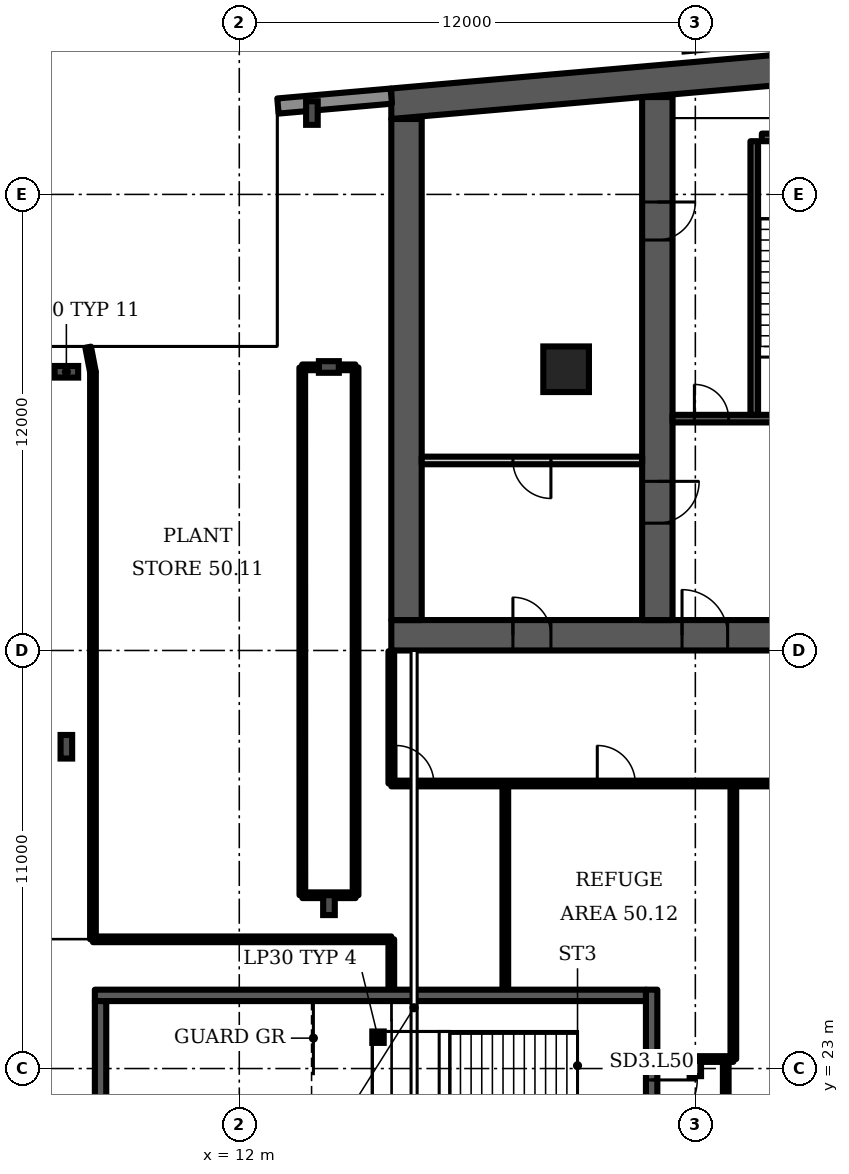
"""IFC4 building model, lengths in metres.
Left out: names, types, materials, properties, quantities, classifications, styles, units other than length and angle.
Written with IfcOpenShell. Run it as: python <this file> out.ifc"""

import sys

from ifc_helpers import new_model, si_unit, direction, frame, frame_2d, origin, origin_2d, place, context, subcontext, project, spatial, polyline, rectangle, i_section, outline, extrude, element, fill, save


model = new_model("IFC4")
c1 = context("Model", 3, precision=1e-05, world=origin(), true_north=direction((0.0, 1.0)))
c2 = subcontext(c1, "Body", "Model", "MODEL_VIEW")
j1 = project(units=[si_unit("LENGTHUNIT", "METRE"), si_unit("PLANEANGLEUNIT", "RADIAN")], contexts=[c1])
p1 = place(None, origin())
s1 = spatial("IfcSite", under=j1, at=p1, CompositionType="ELEMENT")
p2 = place(p1, origin())
s2 = spatial("IfcBuilding", under=s1, at=p2, CompositionType="ELEMENT")
p3 = place(p2, frame((0.0, 0.0, 202.3)))
s3 = spatial("IfcBuildingStorey", under=s2, at=p3, CompositionType="ELEMENT", Elevation=202.3)
p4 = place(p3, origin())
e1 = element("IfcWall", 1, at=p4, inside=s3, PredefinedType="SHEAR", context=c2, shape_type="SweptSolid", body=[
    extrude(outline(polyline([(16.0, 47.984), (37.0, 49.822), (58.0, 47.984), (58.0, 48.787), (37.0, 50.625), (16.0, 48.787), (16.0, 47.984)])), origin(), (0.0, 0.0, 1.0), 4.8),
])
p5 = place(p3, frame((16.0, 34.4, 0.0), z_axis=(0.0, 0.0, 1.0), x_axis=(1.0, 0.0, 0.0)))
e2 = element("IfcWall", 2, at=p5, inside=s3, PredefinedType="SHEAR", context=c2, shape_type="SweptSolid", body=[
    extrude(rectangle(XDim=42.0, YDim=0.8, at=frame_2d((21.0, 0.0))), origin(), (0.0, 0.0, 1.0), 4.8),
])
p6 = place(p5, frame((3.2, 0.0, 0.0)))
e3 = element("IfcOpeningElement", 3, at=p6, cuts=e2, PredefinedType="OPENING", context=c2, shape_type="SweptSolid", body=[
    extrude(rectangle(XDim=1.0, YDim=2.1, at=frame_2d((0.5, 1.05))), frame((0.0, 0.41, 0.0), z_axis=(0.0, -1.0, 0.0), x_axis=(1.0, 0.0, 0.0)), (0.0, 0.0, 1.0), 0.82),
])
p7 = place(p5, frame((7.65, 0.0, 0.0)))
e4 = element("IfcOpeningElement", 4, at=p7, cuts=e2, PredefinedType="OPENING", context=c2, shape_type="SweptSolid", body=[
    extrude(rectangle(XDim=1.2, YDim=2.1, at=frame_2d((0.6, 1.05))), frame((0.0, 0.41, 0.0), z_axis=(0.0, -1.0, 0.0), x_axis=(1.0, 0.0, 0.0)), (0.0, 0.0, 1.0), 0.82),
])
p8 = place(p5, frame((14.767, 0.0, 0.0)))
e5 = element("IfcOpeningElement", 5, at=p8, cuts=e2, PredefinedType="OPENING", context=c2, shape_type="SweptSolid", body=[
    extrude(rectangle(XDim=1.1, YDim=2.1, at=frame_2d((0.55, 1.05))), frame((0.0, 0.41, 0.0), z_axis=(0.0, -1.0, 0.0), x_axis=(1.0, 0.0, 0.0)), (0.0, 0.0, 1.0), 0.82),
])
p9 = place(p5, frame((19.133, 0.0, 0.0)))
e6 = element("IfcOpeningElement", 6, at=p9, cuts=e2, PredefinedType="OPENING", context=c2, shape_type="SweptSolid", body=[
    extrude(rectangle(XDim=1.1, YDim=2.1, at=frame_2d((0.55, 1.05))), frame((0.0, 0.41, 0.0), z_axis=(0.0, -1.0, 0.0), x_axis=(1.0, 0.0, 0.0)), (0.0, 0.0, 1.0), 0.82),
])
p10 = place(p5, frame((16.8, 0.0, 0.0)))
e7 = element("IfcOpeningElement", 7, at=p10, cuts=e2, PredefinedType="OPENING", context=c2, shape_type="SweptSolid", body=[
    extrude(rectangle(XDim=1.4, YDim=2.1, at=frame_2d((0.7, 1.05))), frame((0.0, 0.41, 0.0), z_axis=(0.0, -1.0, 0.0), x_axis=(1.0, 0.0, 0.0)), (0.0, 0.0, 1.0), 0.82),
])
p11 = place(p5, frame((21.767, 0.0, 0.0)))
e8 = element("IfcOpeningElement", 8, at=p11, cuts=e2, PredefinedType="OPENING", context=c2, shape_type="SweptSolid", body=[
    extrude(rectangle(XDim=1.1, YDim=2.1, at=frame_2d((0.55, 1.05))), frame((0.0, 0.41, 0.0), z_axis=(0.0, -1.0, 0.0), x_axis=(1.0, 0.0, 0.0)), (0.0, 0.0, 1.0), 0.82),
])
p12 = place(p5, frame((23.95, 0.0, 0.0)))
e9 = element("IfcOpeningElement", 9, at=p12, cuts=e2, PredefinedType="OPENING", context=c2, shape_type="SweptSolid", body=[
    extrude(rectangle(XDim=1.1, YDim=2.1, at=frame_2d((0.55, 1.05))), frame((0.0, 0.41, 0.0), z_axis=(0.0, -1.0, 0.0), x_axis=(1.0, 0.0, 0.0)), (0.0, 0.0, 1.0), 0.82),
])
p13 = place(p5, frame((26.133, 0.0, 0.0)))
e10 = element("IfcOpeningElement", 10, at=p13, cuts=e2, PredefinedType="OPENING", context=c2, shape_type="SweptSolid", body=[
    extrude(rectangle(XDim=1.1, YDim=2.1, at=frame_2d((0.55, 1.05))), frame((0.0, 0.41, 0.0), z_axis=(0.0, -1.0, 0.0), x_axis=(1.0, 0.0, 0.0)), (0.0, 0.0, 1.0), 0.82),
])
p14 = place(p5, frame((33.15, 0.0, 0.0)))
e11 = element("IfcOpeningElement", 11, at=p14, cuts=e2, PredefinedType="OPENING", context=c2, shape_type="SweptSolid", body=[
    extrude(rectangle(XDim=1.2, YDim=2.1, at=frame_2d((0.6, 1.05))), frame((0.0, 0.41, 0.0), z_axis=(0.0, -1.0, 0.0), x_axis=(1.0, 0.0, 0.0)), (0.0, 0.0, 1.0), 0.82),
])
p15 = place(p5, frame((37.767, 0.0, 0.0)))
e12 = element("IfcOpeningElement", 12, at=p15, cuts=e2, PredefinedType="OPENING", context=c2, shape_type="SweptSolid", body=[
    extrude(rectangle(XDim=1.4, YDim=2.1, at=frame_2d((0.7, 1.05))), frame((0.0, 0.41, 0.0), z_axis=(0.0, -1.0, 0.0), x_axis=(1.0, 0.0, 0.0)), (0.0, 0.0, 1.0), 0.82),
])
p16 = place(p3, frame((16.4, 34.8, 0.0), z_axis=(0.0, 0.0, 1.0), x_axis=(0.0, 1.0, 0.0)))
e13 = element("IfcWall", 13, at=p16, inside=s3, PredefinedType="SHEAR", context=c2, shape_type="SweptSolid", body=[
    extrude(rectangle(XDim=13.184, YDim=0.8, at=frame_2d((6.592, 0.0))), origin(), (0.0, 0.0, 1.0), 4.8),
])
p17 = place(p3, frame((23.0, 34.8, 0.0), z_axis=(0.0, 0.0, 1.0), x_axis=(0.0, 1.0, 0.0)))
e14 = element("IfcWall", 14, at=p17, inside=s3, PredefinedType="SHEAR", context=c2, shape_type="SweptSolid", body=[
    extrude(rectangle(XDim=13.762, YDim=0.8, at=frame_2d((6.881, 0.0))), origin(), (0.0, 0.0, 1.0), 4.8),
])
p18 = place(p17, frame((2.55, 0.0, 0.0)))
e15 = element("IfcOpeningElement", 15, at=p18, cuts=e14, PredefinedType="OPENING", context=c2, shape_type="SweptSolid", body=[
    extrude(rectangle(XDim=1.1, YDim=2.1, at=frame_2d((0.55, 1.05))), frame((0.0, 0.41, 0.0), z_axis=(0.0, -1.0, 0.0), x_axis=(1.0, 0.0, 0.0)), (0.0, 0.0, 1.0), 0.82),
])
p19 = place(p17, frame((10.0, 0.0, 0.0)))
e16 = element("IfcOpeningElement", 16, at=p19, cuts=e14, PredefinedType="OPENING", context=c2, shape_type="SweptSolid", body=[
    extrude(rectangle(XDim=1.0, YDim=2.1, at=frame_2d((0.5, 1.05))), frame((0.0, 0.41, 0.0), z_axis=(0.0, -1.0, 0.0), x_axis=(1.0, 0.0, 0.0)), (0.0, 0.0, 1.0), 0.82),
])
p20 = place(p3, frame((20.6, 41.4, 0.0), z_axis=(0.0, 0.0, 1.0), x_axis=(1.0, 0.0, 0.0)))
e17 = element("IfcColumn", 17, at=p20, inside=s3, PredefinedType="COLUMN", context=c2, shape_type="SweptSolid", body=[
    extrude(rectangle(XDim=1.2, YDim=1.2, at=origin_2d()), origin(), (0.0, 0.0, 1.0), 4.8),
])
for number, where, z_axis, x_axis in (
    (18, (14.357, 41.46, 0.0), (0.0, 0.0, 1.0), (0.0, 1.0, 0.0)),
    (19, (14.36, 27.3, 0.0), (0.0, 0.0, 1.0), (-1.0, 0.0, 0.0)),
):
    element("IfcColumn", number, at=place(p3, frame(where, z_axis=z_axis, x_axis=x_axis)), inside=s3, PredefinedType="COLUMN", context=c2, shape_type="SweptSolid", body=[
        extrude(i_section(OverallWidth=0.306, OverallDepth=0.524, WebThickness=0.021, FlangeThickness=0.04, FilletRadius=0.027, at=origin_2d()), origin(), (0.0, 0.0, 1.0), 4.8),
    ])
p21 = place(p3, frame((24.0, 23.0, 0.0), z_axis=(0.0, 0.0, 1.0), x_axis=(1.0, 0.0, 0.0)))
e20 = element("IfcColumn", 20, at=p21, inside=s3, PredefinedType="COLUMN", context=c2, shape_type="SweptSolid", body=[
    extrude(i_section(OverallWidth=0.3, OverallDepth=0.4, WebThickness=0.013, FlangeThickness=0.024, FilletRadius=0.027, at=origin_2d()), origin(), (0.0, 0.0, 1.0), 4.8),
])
for number, where, z_axis, x_axis in (
    (21, (13.911, 48.141, 0.0), (0.0, 0.0, 1.0), (-1.0, 0.0, 0.0)),
    (22, (7.45, 41.333, 0.0), (0.0, 0.0, 1.0), (0.0, 1.0, 0.0)),
    (23, (7.45, 31.467, 0.0), (0.0, 0.0, 1.0), (-1.0, 0.0, 0.0)),
):
    element("IfcColumn", number, at=place(p3, frame(where, z_axis=z_axis, x_axis=x_axis)), inside=s3, PredefinedType="COLUMN", context=c2, shape_type="SweptSolid", body=[
        extrude(i_section(OverallWidth=0.305, OverallDepth=0.62, WebThickness=0.021, FlangeThickness=0.04, FilletRadius=0.027, at=origin_2d()), origin(), (0.0, 0.0, 1.0), 4.8),
    ])
p22 = place(p3, frame((16.0, 48.587, 0.0), z_axis=(0.0, 0.0, 1.0), x_axis=(-0.996194, -0.087168, 0.0)))
e24 = element("IfcWall", 24, at=p22, inside=s3, PredefinedType="SOLIDWALL", context=c2, shape_type="SweptSolid", body=[
    extrude(rectangle(XDim=2.994, YDim=0.4, at=frame_2d((1.497, 0.0))), origin(), (0.0, 0.0, 1.0), 4.4),
])
p23 = place(p3, frame((16.8, 39.0, 0.0), z_axis=(0.0, 0.0, 1.0), x_axis=(1.0, 0.0, 0.0)))
e25 = element("IfcWall", 25, at=p23, inside=s3, PredefinedType="PARTITIONING", context=c2, shape_type="SweptSolid", body=[
    extrude(rectangle(XDim=5.8, YDim=0.2, at=frame_2d((2.9, 0.0))), origin(), (0.0, 0.0, 1.0), 4.4),
])
p24 = place(p23, frame((2.4, 0.0, 0.0)))
e26 = element("IfcOpeningElement", 26, at=p24, cuts=e25, PredefinedType="OPENING", context=c2, shape_type="SweptSolid", body=[
    extrude(rectangle(XDim=1.0, YDim=2.1, at=frame_2d((0.5, 1.05))), frame((0.0, 0.11, 0.0), z_axis=(0.0, -1.0, 0.0), x_axis=(1.0, 0.0, 0.0)), (0.0, 0.0, 1.0), 0.22),
])
p25 = place(p3, frame((23.4, 40.1, 0.0), z_axis=(0.0, 0.0, 1.0), x_axis=(1.0, 0.0, 0.0)))
e27 = element("IfcWall", 27, at=p25, inside=s3, PredefinedType="SHEAR", context=c2, shape_type="SweptSolid", body=[
    extrude(rectangle(XDim=6.2, YDim=0.2, at=frame_2d((3.1, 0.0))), origin(), (0.0, 0.0, 1.0), 4.4),
])
p26 = place(p25, frame((3.525, 0.0, 0.0)))
e28 = element("IfcOpeningElement", 28, at=p26, cuts=e27, PredefinedType="OPENING", context=c2, shape_type="SweptSolid", body=[
    extrude(rectangle(XDim=1.2, YDim=2.1, at=frame_2d((0.6, 1.05))), frame((0.0, 0.11, 0.0), z_axis=(0.0, -1.0, 0.0), x_axis=(1.0, 0.0, 0.0)), (0.0, 0.0, 1.0), 0.22),
])
p27 = place(p25, frame((0.575, 0.0, 0.0)))
e29 = element("IfcOpeningElement", 29, at=p27, cuts=e27, PredefinedType="OPENING", context=c2, shape_type="SweptSolid", body=[
    extrude(rectangle(XDim=0.9, YDim=2.1, at=frame_2d((0.45, 1.05))), frame((0.0, 0.11, 0.0), z_axis=(0.0, -1.0, 0.0), x_axis=(1.0, 0.0, 0.0)), (0.0, 0.0, 1.0), 0.22),
])
p28 = place(p3, frame((25.55, 40.2, 0.0), z_axis=(0.0, 0.0, 1.0), x_axis=(0.0, 1.0, 0.0)))
e30 = element("IfcWall", 30, at=p28, inside=s3, PredefinedType="SHEAR", context=c2, shape_type="SweptSolid", body=[
    extrude(rectangle(XDim=7.2, YDim=0.2, at=frame_2d((3.6, 0.0))), origin(), (0.0, 0.0, 1.0), 4.4),
])
p29 = place(p3, frame((25.75, 47.5, 0.0), z_axis=(0.0, 0.0, 1.0), x_axis=(1.0, 0.0, 0.0)))
e31 = element("IfcWall", 31, at=p29, inside=s3, PredefinedType="SHEAR", context=c2, shape_type="SweptSolid", body=[
    extrude(rectangle(XDim=3.85, YDim=0.2, at=frame_2d((1.925, 0.0))), origin(), (0.0, 0.0, 1.0), 4.4),
])
p30 = place(p3, frame((22.85, 19.925, 0.0), z_axis=(0.0, 0.0, 1.0), x_axis=(0.0, 1.0, 0.0)))
e32 = element("IfcWall", 32, at=p30, inside=s3, PredefinedType="SHEAR", context=c2, shape_type="SweptSolid", body=[
    extrude(rectangle(XDim=5.15, YDim=0.3, at=frame_2d((2.575, 0.0))), origin(), (0.0, 0.0, 1.0), 4.4),
])
p31 = place(p30, frame((1.575, 0.0, 0.0)))
e33 = element("IfcOpeningElement", 33, at=p31, cuts=e32, PredefinedType="OPENING", context=c2, shape_type="SweptSolid", body=[
    extrude(rectangle(XDim=1.2, YDim=2.1, at=frame_2d((0.6, 1.05))), frame((0.0, 0.16, 0.0), z_axis=(0.0, -1.0, 0.0), x_axis=(1.0, 0.0, 0.0)), (0.0, 0.0, 1.0), 0.32),
])
p32 = place(p3, frame((8.15, 41.325, 0.0), z_axis=(0.0, 0.0, 1.0), x_axis=(-0.188861, 0.982004, 0.0)))
e34 = element("IfcWall", 34, at=p32, inside=s3, PredefinedType="PARTITIONING", context=c2, shape_type="SweptSolid", body=[
    extrude(rectangle(XDim=0.667, YDim=0.15, at=frame_2d((0.333, 0.0))), origin(), (0.0, 0.0, 1.0), 4.4),
])
p33 = place(p3, frame((8.15, 26.4, 0.0), z_axis=(0.0, 0.0, 1.0), x_axis=(0.0, 1.0, 0.0)))
e35 = element("IfcWall", 35, at=p33, inside=s3, PredefinedType="PARTITIONING", context=c2, shape_type="SweptSolid", body=[
    extrude(rectangle(XDim=14.923, YDim=0.15, at=frame_2d((7.461, 0.0))), origin(), (0.0, 0.0, 1.0), 4.4),
])
p34 = place(p3, frame((8.15, 26.4, 0.0), z_axis=(0.0, 0.0, 1.0), x_axis=(1.0, 0.0, 0.0)))
e36 = element("IfcWall", 36, at=p34, inside=s3, PredefinedType="PARTITIONING", context=c2, shape_type="SweptSolid", body=[
    extrude(rectangle(XDim=7.85, YDim=0.15, at=frame_2d((3.925, 0.0))), origin(), (0.0, 0.0, 1.0), 4.4),
])
p35 = place(p3, frame((13.655, 41.45, 0.0), z_axis=(0.0, 0.0, 1.0), x_axis=(1.0, 0.0, 0.0)))
e37 = element("IfcWall", 37, at=p35, inside=s3, PredefinedType="PARTITIONING", context=c2, shape_type="SweptSolid", body=[
    extrude(rectangle(XDim=1.4, YDim=0.15, at=frame_2d((0.7, 0.0))), origin(), (0.0, 0.0, 1.0), 4.4),
])
p36 = place(p3, frame((13.66, 27.562, 0.0), z_axis=(0.0, 0.0, 1.0), x_axis=(-0.000211, 0.999998, 0.0)))
e38 = element("IfcWall", 38, at=p36, inside=s3, PredefinedType="PARTITIONING", context=c2, shape_type="SweptSolid", body=[
    extrude(rectangle(XDim=13.883, YDim=0.15, at=frame_2d((6.941, 0.0))), origin(), (0.0, 0.0, 1.0), 4.4),
])
p37 = place(p3, frame((13.66, 27.56, 0.0), z_axis=(0.0, 0.0, 1.0), x_axis=(1.0, 0.0, 0.0)))
e39 = element("IfcWall", 39, at=p37, inside=s3, PredefinedType="PARTITIONING", context=c2, shape_type="SweptSolid", body=[
    extrude(rectangle(XDim=1.4, YDim=0.15, at=frame_2d((0.7, 0.0))), origin(), (0.0, 0.0, 1.0), 4.4),
])
p38 = place(p3, frame((15.06, 27.56, 0.0), z_axis=(0.0, 0.0, 1.0), x_axis=(0.0, 1.0, 0.0)))
e40 = element("IfcWall", 40, at=p38, inside=s3, PredefinedType="PARTITIONING", context=c2, shape_type="SweptSolid", body=[
    extrude(rectangle(XDim=13.886, YDim=0.15, at=frame_2d((6.943, 0.0))), origin(), (0.0, 0.0, 1.0), 4.4),
])
p39 = place(p3, frame((16.0, 25.095, 0.0), z_axis=(0.0, 0.0, 1.0), x_axis=(0.0, 1.0, 0.0)))
e41 = element("IfcWall", 41, at=p39, inside=s3, PredefinedType="PARTITIONING", context=c2, shape_type="SweptSolid", body=[
    extrude(rectangle(XDim=1.305, YDim=0.15, at=frame_2d((0.652, 0.0))), origin(), (0.0, 0.0, 1.0), 4.4),
])
p40 = place(p3, frame((16.0, 30.5, 0.0), z_axis=(0.0, 0.0, 1.0), x_axis=(0.0, 1.0, 0.0)))
e42 = element("IfcWall", 42, at=p40, inside=s3, PredefinedType="PARTITIONING", context=c2, shape_type="SweptSolid", body=[
    extrude(rectangle(XDim=3.48, YDim=0.15, at=frame_2d((1.74, 0.0))), origin(), (0.0, 0.0, 1.0), 4.4),
])
p41 = place(p3, frame((16.0, 30.5, 0.0), z_axis=(0.0, 0.0, 1.0), x_axis=(1.0, 0.0, 0.0)))
e43 = element("IfcWall", 43, at=p41, inside=s3, PredefinedType="PARTITIONING", context=c2, shape_type="SweptSolid", body=[
    extrude(rectangle(XDim=20.85, YDim=0.15, at=frame_2d((10.425, 0.0))), origin(), (0.0, 0.0, 1.0), 4.4),
])
p42 = place(p41, frame((0.12, 0.0, 0.0)))
e44 = element("IfcOpeningElement", 44, at=p42, cuts=e43, PredefinedType="OPENING", context=c2, shape_type="SweptSolid", body=[
    extrude(rectangle(XDim=1.0, YDim=2.1, at=frame_2d((0.5, 1.05))), frame((0.0, 0.085, 0.0), z_axis=(0.0, -1.0, 0.0), x_axis=(1.0, 0.0, 0.0)), (0.0, 0.0, 1.0), 0.17),
])
p43 = place(p41, frame((5.42, 0.0, 0.0)))
e45 = element("IfcOpeningElement", 45, at=p43, cuts=e43, PredefinedType="OPENING", context=c2, shape_type="SweptSolid", body=[
    extrude(rectangle(XDim=1.0, YDim=2.1, at=frame_2d((0.5, 1.05))), frame((0.0, 0.085, 0.0), z_axis=(0.0, -1.0, 0.0), x_axis=(1.0, 0.0, 0.0)), (0.0, 0.0, 1.0), 0.17),
])
p44 = place(p41, frame((14.5, 0.0, 0.0)))
e46 = element("IfcOpeningElement", 46, at=p44, cuts=e43, PredefinedType="OPENING", context=c2, shape_type="SweptSolid", body=[
    extrude(rectangle(XDim=1.0, YDim=2.1, at=frame_2d((0.5, 1.05))), frame((0.0, 0.085, 0.0), z_axis=(0.0, -1.0, 0.0), x_axis=(1.0, 0.0, 0.0)), (0.0, 0.0, 1.0), 0.17),
])
p45 = place(p3, frame((19.0, 25.095, 0.0), z_axis=(0.0, 0.0, 1.0), x_axis=(0.0, 1.0, 0.0)))
e47 = element("IfcWall", 47, at=p45, inside=s3, PredefinedType="PARTITIONING", context=c2, shape_type="SweptSolid", body=[
    extrude(rectangle(XDim=5.405, YDim=0.15, at=frame_2d((2.703, 0.0))), origin(), (0.0, 0.0, 1.0), 4.4),
])
p46 = place(p3, frame((23.02, 23.25, 0.0), z_axis=(0.0, 0.0, 1.0), x_axis=(1.0, 0.0, 0.0)))
e48 = element("IfcWall", 48, at=p46, inside=s3, PredefinedType="PARTITIONING", context=c2, shape_type="SweptSolid", body=[
    extrude(rectangle(XDim=1.98, YDim=0.15, at=frame_2d((0.99, 0.0))), origin(), (0.0, 0.0, 1.0), 4.4),
])
p47 = place(p3, frame((24.8, 16.145, 0.0), z_axis=(0.0, 0.0, 1.0), x_axis=(0.0, 1.0, 0.0)))
e49 = element("IfcWall", 49, at=p47, inside=s3, PredefinedType="PARTITIONING", context=c2, shape_type="SweptSolid", body=[
    extrude(rectangle(XDim=7.105, YDim=0.15, at=frame_2d((3.552, 0.0))), origin(), (0.0, 0.0, 1.0), 4.4),
])
p48 = place(p3, frame((25.0, 23.25, 0.0), z_axis=(0.0, 0.0, 1.0), x_axis=(0.0, 1.0, 0.0)))
e50 = element("IfcWall", 50, at=p48, inside=s3, PredefinedType="PARTITIONING", context=c2, shape_type="SweptSolid", body=[
    extrude(rectangle(XDim=7.25, YDim=0.15, at=frame_2d((3.625, 0.0))), origin(), (0.0, 0.0, 1.0), 4.4),
])
p49 = place(p3, frame((8.2, 24.925, 0.0), z_axis=(0.0, 0.0, 1.0), x_axis=(1.0, 0.0, 0.0)))
e51 = element("IfcWall", 51, at=p49, inside=s3, PredefinedType="SHEAR", context=c2, shape_type="SweptSolid", body=[
    extrude(rectangle(XDim=14.5, YDim=0.3, at=frame_2d((7.25, 0.0))), origin(), (0.0, 0.0, 1.0), 4.4),
])
p50 = place(p3, frame((8.35, 20.225, 0.0), z_axis=(0.0, 0.0, 1.0), x_axis=(0.0, 1.0, 0.0)))
e52 = element("IfcWall", 52, at=p50, inside=s3, PredefinedType="SHEAR", context=c2, shape_type="SweptSolid", body=[
    extrude(rectangle(XDim=4.55, YDim=0.3, at=frame_2d((2.275, 0.0))), origin(), (0.0, 0.0, 1.0), 4.4),
])
p51 = place(p3, frame((15.65, 23.825, 0.0), z_axis=(0.0, 0.0, 1.0), x_axis=(1.0, 0.0, 0.0)))
e53 = element("IfcColumn", 53, at=p51, inside=s3, PredefinedType="COLUMN", context=c2, shape_type="SweptSolid", body=[
    extrude(rectangle(XDim=0.3, YDim=0.3, at=origin_2d()), origin(), (0.0, 0.0, 1.0), 2.2),
])
p52 = place(p6, origin())
e54 = element("IfcDoor", 54, at=p52, inside=s3, OperationType="SINGLE_SWING_LEFT", PredefinedType="DOOR", context=c2, shape_type="SweptSolid", body=[
    extrude(rectangle(XDim=1.0, YDim=2.1, at=frame_2d((0.5, 1.05))), frame((0.0, 0.4, 0.0), z_axis=(0.0, -1.0, 0.0), x_axis=(1.0, 0.0, 0.0)), (0.0, 0.0, 1.0), 0.8),
])
fill(e3, e54)
p53 = place(p24, origin())
e55 = element("IfcDoor", 55, at=p53, inside=s3, OperationType="SINGLE_SWING_RIGHT", PredefinedType="DOOR", context=c2, shape_type="SweptSolid", body=[
    extrude(rectangle(XDim=1.0, YDim=2.1, at=frame_2d((0.5, 1.05))), frame((0.0, 0.025, 0.0), z_axis=(0.0, -1.0, 0.0), x_axis=(1.0, 0.0, 0.0)), (0.0, 0.0, 1.0), 0.05),
])
fill(e26, e55)
p54 = place(p27, origin())
e56 = element("IfcDoor", 56, at=p54, inside=s3, OperationType="SINGLE_SWING_LEFT", PredefinedType="DOOR", context=c2, shape_type="SweptSolid", body=[
    extrude(rectangle(XDim=0.9, YDim=2.1, at=frame_2d((0.45, 1.05))), frame((0.0, 0.025, 0.0), z_axis=(0.0, -1.0, 0.0), x_axis=(1.0, 0.0, 0.0)), (0.0, 0.0, 1.0), 0.05),
])
fill(e29, e56)
p55 = place(p7, origin())
e57 = element("IfcDoor", 57, at=p55, inside=s3, OperationType="SINGLE_SWING_LEFT", PredefinedType="DOOR", context=c2, shape_type="SweptSolid", body=[
    extrude(rectangle(XDim=1.2, YDim=2.1, at=frame_2d((0.6, 1.05))), frame((0.0, 0.025, 0.0), z_axis=(0.0, -1.0, 0.0), x_axis=(1.0, 0.0, 0.0)), (0.0, 0.0, 1.0), 0.05),
])
fill(e4, e57)
p56 = place(p18, origin())
e58 = element("IfcDoor", 58, at=p56, inside=s3, OperationType="SINGLE_SWING_RIGHT", PredefinedType="DOOR", context=c2, shape_type="SweptSolid", body=[
    extrude(rectangle(XDim=1.1, YDim=2.1, at=frame_2d((0.55, 1.05))), frame((0.0, 0.025, 0.0), z_axis=(0.0, -1.0, 0.0), x_axis=(1.0, 0.0, 0.0)), (0.0, 0.0, 1.0), 0.05),
])
fill(e15, e58)
p57 = place(p19, origin())
e59 = element("IfcDoor", 59, at=p57, inside=s3, OperationType="SINGLE_SWING_RIGHT", PredefinedType="DOOR", context=c2, shape_type="SweptSolid", body=[
    extrude(rectangle(XDim=1.0, YDim=2.1, at=frame_2d((0.5, 1.05))), frame((0.0, 0.4, 0.0), z_axis=(0.0, -1.0, 0.0), x_axis=(1.0, 0.0, 0.0)), (0.0, 0.0, 1.0), 0.8),
])
fill(e16, e59)
p58 = place(p31, origin())
e60 = element("IfcDoor", 60, at=p58, inside=s3, OperationType="SINGLE_SWING_RIGHT", PredefinedType="DOOR", context=c2, shape_type="SweptSolid", body=[
    extrude(rectangle(XDim=1.2, YDim=2.1, at=frame_2d((0.6, 1.05))), frame((0.0, 0.025, 0.0), z_axis=(0.0, -1.0, 0.0), x_axis=(1.0, 0.0, 0.0)), (0.0, 0.0, 1.0), 0.05),
])
fill(e33, e60)
p59 = place(p42, origin())
e61 = element("IfcDoor", 61, at=p59, inside=s3, OperationType="SINGLE_SWING_LEFT", PredefinedType="DOOR", context=c2, shape_type="SweptSolid", body=[
    extrude(rectangle(XDim=1.0, YDim=2.1, at=frame_2d((0.5, 1.05))), frame((0.0, 0.025, 0.0), z_axis=(0.0, -1.0, 0.0), x_axis=(1.0, 0.0, 0.0)), (0.0, 0.0, 1.0), 0.05),
])
fill(e44, e61)
p60 = place(p43, origin())
e62 = element("IfcDoor", 62, at=p60, inside=s3, OperationType="SINGLE_SWING_LEFT", PredefinedType="DOOR", context=c2, shape_type="SweptSolid", body=[
    extrude(rectangle(XDim=1.0, YDim=2.1, at=frame_2d((0.5, 1.05))), frame((0.0, 0.025, 0.0), z_axis=(0.0, -1.0, 0.0), x_axis=(1.0, 0.0, 0.0)), (0.0, 0.0, 1.0), 0.05),
])
fill(e45, e62)
save(model, sys.argv[1])
